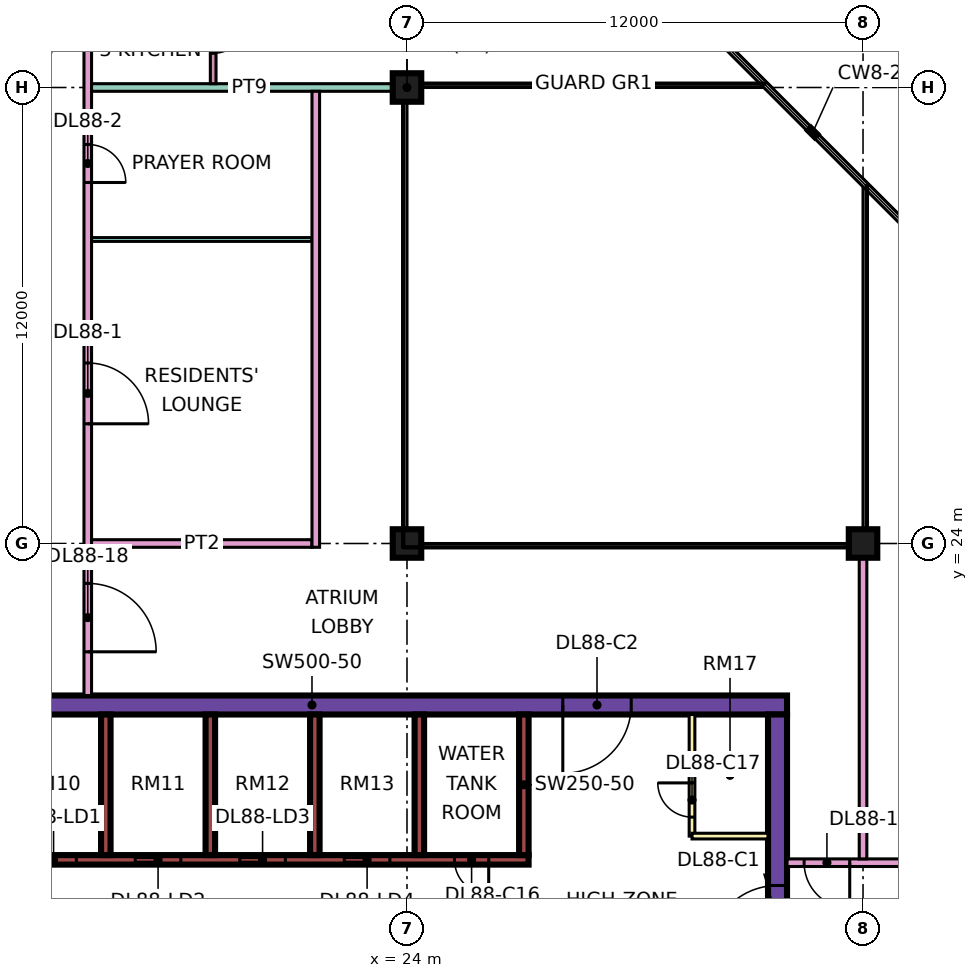
"""IFC4 building model, lengths in metres.
Left out: names, types, materials, properties, quantities, classifications, styles, units other than length and angle.
Written with IfcOpenShell. Run it as: python <this file> out.ifc"""

import sys

from ifc_helpers import new_model, si_unit, direction, frame, frame_2d, origin, origin_2d, place, context, subcontext, project, spatial, rectangle, extrude, element, fill, save


model = new_model("IFC4")
c1 = context("Model", 3, precision=1e-05, world=origin(), true_north=direction((0.0, 1.0)))
c2 = subcontext(c1, "Body", "Model", "MODEL_VIEW")
j1 = project(units=[si_unit("LENGTHUNIT", "METRE"), si_unit("PLANEANGLEUNIT", "RADIAN")], contexts=[c1])
p1 = place(None, origin())
s1 = spatial("IfcSite", under=j1, at=p1, CompositionType="ELEMENT")
p2 = place(p1, origin())
s2 = spatial("IfcBuilding", under=s1, at=p2, CompositionType="ELEMENT")
p3 = place(p2, frame((0.0, 0.0, 376.4)))
s3 = spatial("IfcBuildingStorey", under=s2, at=p3, CompositionType="ELEMENT", Elevation=376.4)
for number, where, z_axis, x_axis in (
    (1, (24.0, 24.0, 0.0), (0.0, 0.0, 1.0), (1.0, 0.0, 0.0)),
    (2, (24.0, 36.0, 0.0), (0.0, 0.0, 1.0), (1.0, 0.0, 0.0)),
    (3, (36.0, 24.0, 0.0), (0.0, 0.0, 1.0), (1.0, 0.0, 0.0)),
):
    element("IfcColumn", number, at=place(p3, frame(where, z_axis=z_axis, x_axis=x_axis)), inside=s3, PredefinedType="COLUMN", context=c2, shape_type="SweptSolid", body=[
        extrude(rectangle(XDim=0.75, YDim=0.75, at=origin_2d()), origin(), (0.0, 0.0, 1.0), 3.75),
    ])
p4 = place(p3, frame((9.0, 19.75, 0.0), z_axis=(0.0, 0.0, 1.0), x_axis=(1.0, 0.0, 0.0)))
e4 = element("IfcWall", 4, at=p4, inside=s3, PredefinedType="SHEAR", context=c2, shape_type="SweptSolid", body=[
    extrude(rectangle(XDim=25.0, YDim=0.5, at=frame_2d((12.5, 0.0))), origin(), (0.0, 0.0, 1.0), 3.75),
])
p5 = place(p4, frame((19.1, 0.0, 0.0)))
e5 = element("IfcOpeningElement", 5, at=p5, cuts=e4, PredefinedType="OPENING", context=c2, shape_type="SweptSolid", body=[
    extrude(rectangle(XDim=1.8, YDim=2.4, at=frame_2d((0.9, 1.2))), frame((0.0, 0.26, 0.0), z_axis=(0.0, -1.0, 0.0), x_axis=(1.0, 0.0, 0.0)), (0.0, 0.0, 1.0), 0.52),
])
p6 = place(p3, frame((33.75, 7.5, 0.0), z_axis=(0.0, 0.0, 1.0), x_axis=(0.0, 1.0, 0.0)))
e6 = element("IfcWall", 6, at=p6, inside=s3, PredefinedType="SHEAR", context=c2, shape_type="SweptSolid", body=[
    extrude(rectangle(XDim=12.0, YDim=0.5, at=frame_2d((6.0, 0.0))), origin(), (0.0, 0.0, 1.0), 3.75),
])
p7 = place(p6, frame((5.7, 0.0, 0.0)))
e7 = element("IfcOpeningElement", 7, at=p7, cuts=e6, PredefinedType="OPENING", context=c2, shape_type="SweptSolid", body=[
    extrude(rectangle(XDim=1.8, YDim=2.4, at=frame_2d((0.9, 1.2))), frame((0.0, 0.26, 0.0), z_axis=(0.0, -1.0, 0.0), x_axis=(1.0, 0.0, 0.0)), (0.0, 0.0, 1.0), 0.52),
])
p8 = place(p3, frame((13.45, 15.675, 0.0), z_axis=(0.0, 0.0, 1.0), x_axis=(1.0, 0.0, 0.0)))
e8 = element("IfcWall", 8, at=p8, inside=s3, PredefinedType="SHEAR", context=c2, shape_type="SweptSolid", body=[
    extrude(rectangle(XDim=13.75, YDim=0.25, at=frame_2d((6.875, 0.0))), origin(), (0.0, 0.0, 1.0), 3.75),
])
p9 = place(p8, frame((0.65, 0.0, 0.0)))
e9 = element("IfcOpeningElement", 9, at=p9, cuts=e8, PredefinedType="OPENING", context=c2, shape_type="SweptSolid", body=[
    extrude(rectangle(XDim=1.2, YDim=2.2, at=frame_2d((0.6, 1.1))), frame((0.0, 0.135, 0.0), z_axis=(0.0, -1.0, 0.0), x_axis=(1.0, 0.0, 0.0)), (0.0, 0.0, 1.0), 0.27),
])
p10 = place(p8, frame((3.4, 0.0, 0.0)))
e10 = element("IfcOpeningElement", 10, at=p10, cuts=e8, PredefinedType="OPENING", context=c2, shape_type="SweptSolid", body=[
    extrude(rectangle(XDim=1.2, YDim=2.2, at=frame_2d((0.6, 1.1))), frame((0.0, 0.135, 0.0), z_axis=(0.0, -1.0, 0.0), x_axis=(1.0, 0.0, 0.0)), (0.0, 0.0, 1.0), 0.27),
])
p11 = place(p8, frame((6.15, 0.0, 0.0)))
e11 = element("IfcOpeningElement", 11, at=p11, cuts=e8, PredefinedType="OPENING", context=c2, shape_type="SweptSolid", body=[
    extrude(rectangle(XDim=1.2, YDim=2.2, at=frame_2d((0.6, 1.1))), frame((0.0, 0.135, 0.0), z_axis=(0.0, -1.0, 0.0), x_axis=(1.0, 0.0, 0.0)), (0.0, 0.0, 1.0), 0.27),
])
p12 = place(p8, frame((8.9, 0.0, 0.0)))
e12 = element("IfcOpeningElement", 12, at=p12, cuts=e8, PredefinedType="OPENING", context=c2, shape_type="SweptSolid", body=[
    extrude(rectangle(XDim=1.2, YDim=2.2, at=frame_2d((0.6, 1.1))), frame((0.0, 0.135, 0.0), z_axis=(0.0, -1.0, 0.0), x_axis=(1.0, 0.0, 0.0)), (0.0, 0.0, 1.0), 0.27),
])
p13 = place(p8, frame((11.8, 0.0, 0.0)))
e13 = element("IfcOpeningElement", 13, at=p13, cuts=e8, PredefinedType="OPENING", context=c2, shape_type="SweptSolid", body=[
    extrude(rectangle(XDim=0.9, YDim=2.1, at=frame_2d((0.45, 1.05))), frame((0.0, 0.135, 0.0), z_axis=(0.0, -1.0, 0.0), x_axis=(1.0, 0.0, 0.0)), (0.0, 0.0, 1.0), 0.27),
])
for number, where, z_axis, x_axis in (
    (14, (16.075, 15.8, 0.0), (0.0, 0.0, 1.0), (0.0, 1.0, 0.0)),
    (15, (18.825, 15.8, 0.0), (0.0, 0.0, 1.0), (0.0, 1.0, 0.0)),
    (16, (21.575, 15.8, 0.0), (0.0, 0.0, 1.0), (0.0, 1.0, 0.0)),
    (17, (24.325, 15.8, 0.0), (0.0, 0.0, 1.0), (0.0, 1.0, 0.0)),
    (18, (27.075, 15.8, 0.0), (0.0, 0.0, 1.0), (0.0, 1.0, 0.0)),
):
    element("IfcWall", number, at=place(p3, frame(where, z_axis=z_axis, x_axis=x_axis)), inside=s3, PredefinedType="SHEAR", context=c2, shape_type="SweptSolid", body=[
        extrude(rectangle(XDim=3.7, YDim=0.25, at=frame_2d((1.85, 0.0))), origin(), (0.0, 0.0, 1.0), 3.75),
    ])
p14 = place(p3, frame((31.5, 16.3, 0.0), z_axis=(0.0, 0.0, 1.0), x_axis=(0.0, 1.0, 0.0)))
e19 = element("IfcWall", 19, at=p14, inside=s3, PredefinedType="PARTITIONING", context=c2, shape_type="SweptSolid", body=[
    extrude(rectangle(XDim=3.2, YDim=0.15, at=frame_2d((1.6, 0.0))), origin(), (0.0, 0.0, 1.0), 3.35),
])
p15 = place(p14, frame((0.5, 0.0, 0.0)))
e20 = element("IfcOpeningElement", 20, at=p15, cuts=e19, PredefinedType="OPENING", context=c2, shape_type="SweptSolid", body=[
    extrude(rectangle(XDim=0.9, YDim=2.1, at=frame_2d((0.45, 1.05))), frame((0.0, 0.085, 0.0), z_axis=(0.0, -1.0, 0.0), x_axis=(1.0, 0.0, 0.0)), (0.0, 0.0, 1.0), 0.17),
])
p16 = place(p3, frame((31.5, 16.3, 0.0), z_axis=(0.0, 0.0, 1.0), x_axis=(1.0, 0.0, 0.0)))
e21 = element("IfcWall", 21, at=p16, inside=s3, PredefinedType="PARTITIONING", context=c2, shape_type="SweptSolid", body=[
    extrude(rectangle(XDim=2.0, YDim=0.15, at=frame_2d((1.0, 0.0))), origin(), (0.0, 0.0, 1.0), 3.35),
])
p17 = place(p3, frame((15.6, 20.0, 0.0), z_axis=(0.0, 0.0, 1.0), x_axis=(0.0, 1.0, 0.0)))
e22 = element("IfcWall", 22, at=p17, inside=s3, PredefinedType="PARTITIONING", context=c2, shape_type="SweptSolid", body=[
    extrude(rectangle(XDim=27.775, YDim=0.2, at=frame_2d((13.887, 0.0))), origin(), (0.0, 0.0, 1.0), 3.35),
])
p18 = place(p17, frame((7.15, 0.0, 0.0)))
e23 = element("IfcOpeningElement", 23, at=p18, cuts=e22, PredefinedType="OPENING", context=c2, shape_type="SweptSolid", body=[
    extrude(rectangle(XDim=1.6, YDim=2.1, at=frame_2d((0.8, 1.05))), frame((0.0, 0.11, 0.0), z_axis=(0.0, -1.0, 0.0), x_axis=(1.0, 0.0, 0.0)), (0.0, 0.0, 1.0), 0.22),
])
p19 = place(p17, frame((13.5, 0.0, 0.0)))
e24 = element("IfcOpeningElement", 24, at=p19, cuts=e22, PredefinedType="OPENING", context=c2, shape_type="SweptSolid", body=[
    extrude(rectangle(XDim=1.0, YDim=2.1, at=frame_2d((0.5, 1.05))), frame((0.0, 0.11, 0.0), z_axis=(0.0, -1.0, 0.0), x_axis=(1.0, 0.0, 0.0)), (0.0, 0.0, 1.0), 0.22),
])
p20 = place(p17, frame((22.9, 0.0, 0.0)))
e25 = element("IfcOpeningElement", 25, at=p20, cuts=e22, PredefinedType="OPENING", context=c2, shape_type="SweptSolid", body=[
    extrude(rectangle(XDim=1.0, YDim=2.1, at=frame_2d((0.5, 1.05))), frame((0.0, 0.11, 0.0), z_axis=(0.0, -1.0, 0.0), x_axis=(1.0, 0.0, 0.0)), (0.0, 0.0, 1.0), 0.22),
])
p21 = place(p17, frame((1.15, 0.0, 0.0)))
e26 = element("IfcOpeningElement", 26, at=p21, cuts=e22, PredefinedType="OPENING", context=c2, shape_type="SweptSolid", body=[
    extrude(rectangle(XDim=1.8, YDim=2.1, at=frame_2d((0.9, 1.05))), frame((0.0, 0.11, 0.0), z_axis=(0.0, -1.0, 0.0), x_axis=(1.0, 0.0, 0.0)), (0.0, 0.0, 1.0), 0.22),
])
p22 = place(p17, frame((25.9, 0.0, 0.0)))
e27 = element("IfcOpeningElement", 27, at=p22, cuts=e22, PredefinedType="OPENING", context=c2, shape_type="SweptSolid", body=[
    extrude(rectangle(XDim=1.0, YDim=2.1, at=frame_2d((0.5, 1.05))), frame((0.0, 0.11, 0.0), z_axis=(0.0, -1.0, 0.0), x_axis=(1.0, 0.0, 0.0)), (0.0, 0.0, 1.0), 0.22),
])
p23 = place(p3, frame((15.7, 24.0, 0.0), z_axis=(0.0, 0.0, 1.0), x_axis=(1.0, 0.0, 0.0)))
e28 = element("IfcWall", 28, at=p23, inside=s3, PredefinedType="PARTITIONING", context=c2, shape_type="SweptSolid", body=[
    extrude(rectangle(XDim=5.8, YDim=0.2, at=frame_2d((2.9, 0.0))), origin(), (0.0, 0.0, 1.0), 3.35),
])
p24 = place(p3, frame((15.7, 32.0, 0.0), z_axis=(0.0, 0.0, 1.0), x_axis=(1.0, 0.0, 0.0)))
e29 = element("IfcWall", 29, at=p24, inside=s3, PredefinedType="PARTITIONING", context=c2, shape_type="SweptSolid", body=[
    extrude(rectangle(XDim=5.8, YDim=0.1, at=frame_2d((2.9, 0.0))), origin(), (0.0, 0.0, 1.0), 3.35),
])
p25 = place(p3, frame((15.7, 36.0, 0.0), z_axis=(0.0, 0.0, 1.0), x_axis=(1.0, 0.0, 0.0)))
e30 = element("IfcWall", 30, at=p25, inside=s3, PredefinedType="PARTITIONING", context=c2, shape_type="SweptSolid", body=[
    extrude(rectangle(XDim=8.3, YDim=0.2, at=frame_2d((4.15, 0.0))), origin(), (0.0, 0.0, 1.0), 3.35),
])
p26 = place(p3, frame((18.9, 36.1, 0.0), z_axis=(0.0, 0.0, 1.0), x_axis=(0.0, 1.0, 0.0)))
e31 = element("IfcWall", 31, at=p26, inside=s3, PredefinedType="PARTITIONING", context=c2, shape_type="SweptSolid", body=[
    extrude(rectangle(XDim=5.675, YDim=0.15, at=frame_2d((2.837, 0.0))), origin(), (0.0, 0.0, 1.0), 3.35),
])
p27 = place(p26, frame((0.8, 0.0, 0.0)))
e32 = element("IfcOpeningElement", 32, at=p27, cuts=e31, PredefinedType="OPENING", context=c2, shape_type="SweptSolid", body=[
    extrude(rectangle(XDim=0.9, YDim=2.1, at=frame_2d((0.45, 1.05))), frame((0.0, 0.085, 0.0), z_axis=(0.0, -1.0, 0.0), x_axis=(1.0, 0.0, 0.0)), (0.0, 0.0, 1.0), 0.17),
])
p28 = place(p3, frame((21.6, 23.9, 0.0), z_axis=(0.0, 0.0, 1.0), x_axis=(0.0, 1.0, 0.0)))
e33 = element("IfcWall", 33, at=p28, inside=s3, PredefinedType="PARTITIONING", context=c2, shape_type="SweptSolid", body=[
    extrude(rectangle(XDim=12.0, YDim=0.2, at=frame_2d((6.0, 0.0))), origin(), (0.0, 0.0, 1.0), 3.35),
])
p29 = place(p3, frame((34.0, 15.6, 0.0), z_axis=(0.0, 0.0, 1.0), x_axis=(1.0, 0.0, 0.0)))
e34 = element("IfcWall", 34, at=p29, inside=s3, PredefinedType="PARTITIONING", context=c2, shape_type="SweptSolid", body=[
    extrude(rectangle(XDim=10.35, YDim=0.2, at=frame_2d((5.175, 0.0))), origin(), (0.0, 0.0, 1.0), 3.35),
])
p30 = place(p29, frame((5.6, 0.0, 0.0)))
e35 = element("IfcOpeningElement", 35, at=p30, cuts=e34, PredefinedType="OPENING", context=c2, shape_type="SweptSolid", body=[
    extrude(rectangle(XDim=1.0, YDim=2.1, at=frame_2d((0.5, 1.05))), frame((0.0, 0.11, 0.0), z_axis=(0.0, -1.0, 0.0), x_axis=(1.0, 0.0, 0.0)), (0.0, 0.0, 1.0), 0.22),
])
p31 = place(p29, frame((0.45, 0.0, 0.0)))
e36 = element("IfcOpeningElement", 36, at=p31, cuts=e34, PredefinedType="OPENING", context=c2, shape_type="SweptSolid", body=[
    extrude(rectangle(XDim=1.2, YDim=2.1, at=frame_2d((0.6, 1.05))), frame((0.0, 0.11, 0.0), z_axis=(0.0, -1.0, 0.0), x_axis=(1.0, 0.0, 0.0)), (0.0, 0.0, 1.0), 0.22),
])
p32 = place(p3, frame((36.0, 15.7, 0.0), z_axis=(0.0, 0.0, 1.0), x_axis=(0.0, 1.0, 0.0)))
e37 = element("IfcWall", 37, at=p32, inside=s3, PredefinedType="PARTITIONING", context=c2, shape_type="SweptSolid", body=[
    extrude(rectangle(XDim=8.3, YDim=0.2, at=frame_2d((4.15, 0.0))), origin(), (0.0, 0.0, 1.0), 3.35),
])
p33 = place(p9, origin())
e38 = element("IfcDoor", 38, at=p33, inside=s3, OperationType="DOUBLE_DOOR_SLIDING", PredefinedType="DOOR", context=c2, shape_type="SweptSolid", body=[
    extrude(rectangle(XDim=1.2, YDim=2.2, at=frame_2d((0.6, 1.1))), frame((0.0, 0.025, 0.0), z_axis=(0.0, -1.0, 0.0), x_axis=(1.0, 0.0, 0.0)), (0.0, 0.0, 1.0), 0.05),
])
fill(e9, e38)
p34 = place(p10, origin())
e39 = element("IfcDoor", 39, at=p34, inside=s3, OperationType="DOUBLE_DOOR_SLIDING", PredefinedType="DOOR", context=c2, shape_type="SweptSolid", body=[
    extrude(rectangle(XDim=1.2, YDim=2.2, at=frame_2d((0.6, 1.1))), frame((0.0, 0.025, 0.0), z_axis=(0.0, -1.0, 0.0), x_axis=(1.0, 0.0, 0.0)), (0.0, 0.0, 1.0), 0.05),
])
fill(e10, e39)
p35 = place(p11, origin())
e40 = element("IfcDoor", 40, at=p35, inside=s3, OperationType="DOUBLE_DOOR_SLIDING", PredefinedType="DOOR", context=c2, shape_type="SweptSolid", body=[
    extrude(rectangle(XDim=1.2, YDim=2.2, at=frame_2d((0.6, 1.1))), frame((0.0, 0.025, 0.0), z_axis=(0.0, -1.0, 0.0), x_axis=(1.0, 0.0, 0.0)), (0.0, 0.0, 1.0), 0.05),
])
fill(e11, e40)
p36 = place(p12, origin())
e41 = element("IfcDoor", 41, at=p36, inside=s3, OperationType="DOUBLE_DOOR_SLIDING", PredefinedType="DOOR", context=c2, shape_type="SweptSolid", body=[
    extrude(rectangle(XDim=1.2, YDim=2.2, at=frame_2d((0.6, 1.1))), frame((0.0, 0.025, 0.0), z_axis=(0.0, -1.0, 0.0), x_axis=(1.0, 0.0, 0.0)), (0.0, 0.0, 1.0), 0.05),
])
fill(e12, e41)
p37 = place(p7, origin())
e42 = element("IfcDoor", 42, at=p37, inside=s3, OperationType="DOUBLE_DOOR_SINGLE_SWING", PredefinedType="DOOR", context=c2, shape_type="SweptSolid", body=[
    extrude(rectangle(XDim=1.8, YDim=2.4, at=frame_2d((0.9, 1.2))), frame((0.0, 0.025, 0.0), z_axis=(0.0, -1.0, 0.0), x_axis=(1.0, 0.0, 0.0)), (0.0, 0.0, 1.0), 0.05),
])
fill(e7, e42)
p38 = place(p5, frame((1.8, 0.0, 0.0), z_axis=(0.0, 0.0, 1.0), x_axis=(-1.0, 0.0, 0.0)))
e43 = element("IfcDoor", 43, at=p38, inside=s3, OperationType="DOUBLE_DOOR_SINGLE_SWING", PredefinedType="DOOR", context=c2, shape_type="SweptSolid", body=[
    extrude(rectangle(XDim=1.8, YDim=2.4, at=frame_2d((0.9, 1.2))), frame((0.0, 0.025, 0.0), z_axis=(0.0, -1.0, 0.0), x_axis=(1.0, 0.0, 0.0)), (0.0, 0.0, 1.0), 0.05),
])
fill(e5, e43)
p39 = place(p13, origin())
e44 = element("IfcDoor", 44, at=p39, inside=s3, OperationType="SINGLE_SWING_RIGHT", PredefinedType="DOOR", context=c2, shape_type="SweptSolid", body=[
    extrude(rectangle(XDim=0.9, YDim=2.1, at=frame_2d((0.45, 1.05))), frame((0.0, 0.025, 0.0), z_axis=(0.0, -1.0, 0.0), x_axis=(1.0, 0.0, 0.0)), (0.0, 0.0, 1.0), 0.05),
])
fill(e13, e44)
p40 = place(p15, frame((0.9, 0.0, 0.0), z_axis=(0.0, 0.0, 1.0), x_axis=(-1.0, 0.0, 0.0)))
e45 = element("IfcDoor", 45, at=p40, inside=s3, OperationType="SINGLE_SWING_RIGHT", PredefinedType="DOOR", context=c2, shape_type="SweptSolid", body=[
    extrude(rectangle(XDim=0.9, YDim=2.1, at=frame_2d((0.45, 1.05))), frame((0.0, 0.025, 0.0), z_axis=(0.0, -1.0, 0.0), x_axis=(1.0, 0.0, 0.0)), (0.0, 0.0, 1.0), 0.05),
])
fill(e20, e45)
p41 = place(p18, frame((1.6, 0.0, 0.0), z_axis=(0.0, 0.0, 1.0), x_axis=(-1.0, 0.0, 0.0)))
e46 = element("IfcDoor", 46, at=p41, inside=s3, OperationType="DOUBLE_DOOR_SINGLE_SWING", PredefinedType="DOOR", context=c2, shape_type="SweptSolid", body=[
    extrude(rectangle(XDim=1.6, YDim=2.1, at=frame_2d((0.8, 1.05))), frame((0.0, 0.025, 0.0), z_axis=(0.0, -1.0, 0.0), x_axis=(1.0, 0.0, 0.0)), (0.0, 0.0, 1.0), 0.05),
])
fill(e23, e46)
p42 = place(p19, frame((1.0, 0.0, 0.0), z_axis=(0.0, 0.0, 1.0), x_axis=(-1.0, 0.0, 0.0)))
e47 = element("IfcDoor", 47, at=p42, inside=s3, OperationType="SINGLE_SWING_LEFT", PredefinedType="DOOR", context=c2, shape_type="SweptSolid", body=[
    extrude(rectangle(XDim=1.0, YDim=2.1, at=frame_2d((0.5, 1.05))), frame((0.0, 0.025, 0.0), z_axis=(0.0, -1.0, 0.0), x_axis=(1.0, 0.0, 0.0)), (0.0, 0.0, 1.0), 0.05),
])
fill(e24, e47)
p43 = place(p27, origin())
e48 = element("IfcDoor", 48, at=p43, inside=s3, OperationType="SINGLE_SWING_RIGHT", PredefinedType="DOOR", context=c2, shape_type="SweptSolid", body=[
    extrude(rectangle(XDim=0.9, YDim=2.1, at=frame_2d((0.45, 1.05))), frame((0.0, 0.025, 0.0), z_axis=(0.0, -1.0, 0.0), x_axis=(1.0, 0.0, 0.0)), (0.0, 0.0, 1.0), 0.05),
])
fill(e32, e48)
p44 = place(p31, origin())
e49 = element("IfcDoor", 49, at=p44, inside=s3, OperationType="SINGLE_SWING_RIGHT", PredefinedType="DOOR", context=c2, shape_type="SweptSolid", body=[
    extrude(rectangle(XDim=1.2, YDim=2.1, at=frame_2d((0.6, 1.05))), frame((0.0, 0.025, 0.0), z_axis=(0.0, -1.0, 0.0), x_axis=(1.0, 0.0, 0.0)), (0.0, 0.0, 1.0), 0.05),
])
fill(e36, e49)
p45 = place(p21, frame((1.8, 0.0, 0.0), z_axis=(0.0, 0.0, 1.0), x_axis=(-1.0, 0.0, 0.0)))
e50 = element("IfcDoor", 50, at=p45, inside=s3, OperationType="DOUBLE_DOOR_SINGLE_SWING", PredefinedType="DOOR", context=c2, shape_type="SweptSolid", body=[
    extrude(rectangle(XDim=1.8, YDim=2.1, at=frame_2d((0.9, 1.05))), frame((0.0, 0.025, 0.0), z_axis=(0.0, -1.0, 0.0), x_axis=(1.0, 0.0, 0.0)), (0.0, 0.0, 1.0), 0.05),
])
fill(e26, e50)
save(model, sys.argv[1])
